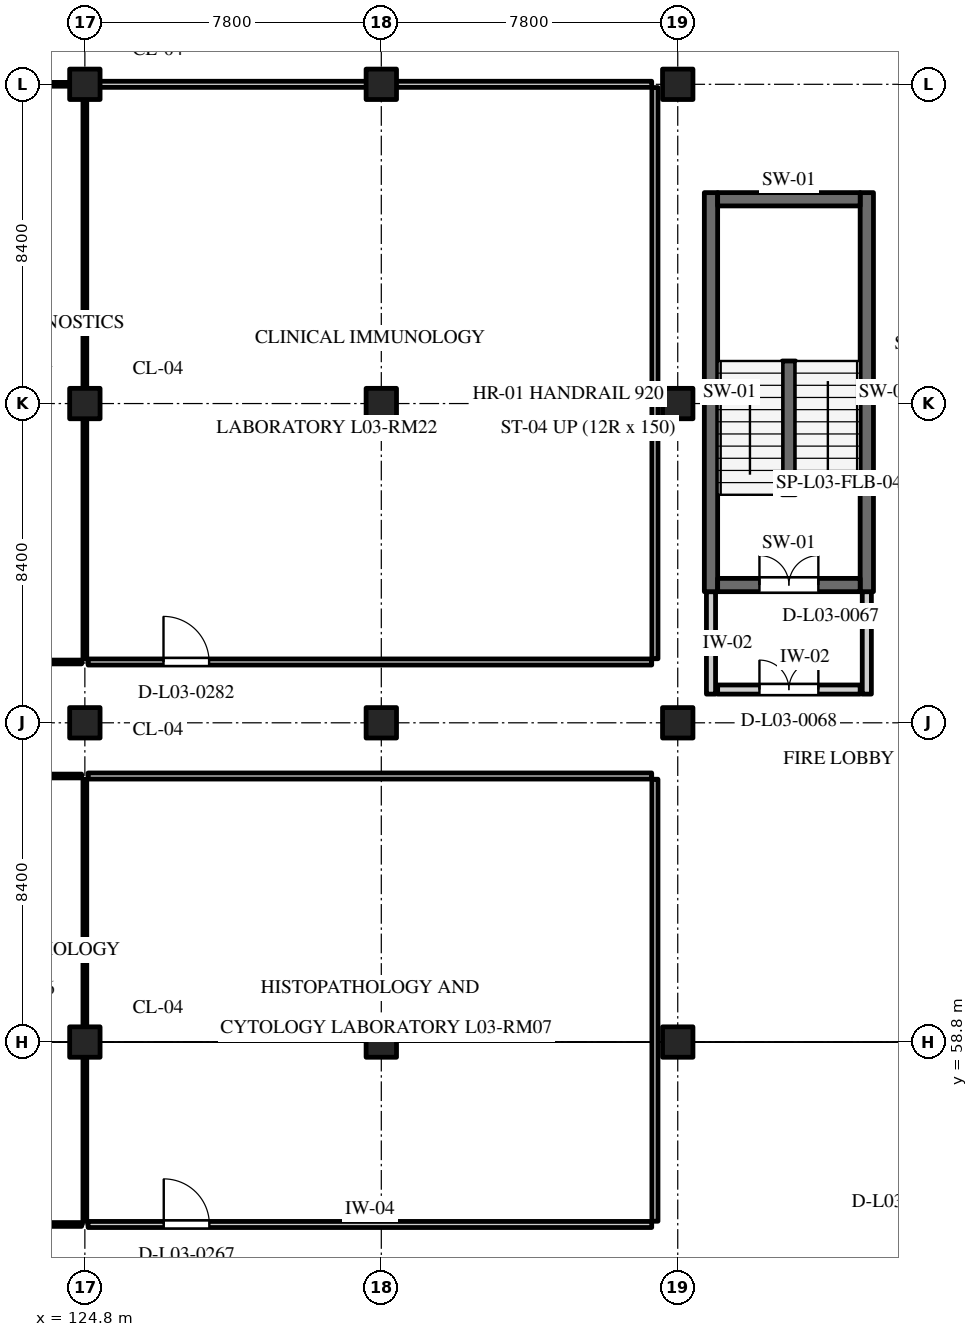
"""IFC4 building model, lengths in metres.
Left out: names, types, materials, properties, quantities, classifications, styles, units other than length and angle.
Written with IfcOpenShell. Run it as: python <this file> out.ifc"""

import sys

from ifc_helpers import new_model, si_unit, direction, frame, frame_2d, origin, origin_2d, place, context, subcontext, project, spatial, rectangle, extrude, element, fill, save


model = new_model("IFC4")
c1 = context("Model", 3, precision=1e-05, world=origin(), true_north=direction((0.0, 1.0)))
c2 = subcontext(c1, "Body", "Model", "MODEL_VIEW")
j1 = project(units=[si_unit("LENGTHUNIT", "METRE"), si_unit("PLANEANGLEUNIT", "RADIAN")], contexts=[c1])
p1 = place(None, origin())
s1 = spatial("IfcSite", under=j1, at=p1, CompositionType="ELEMENT")
p2 = place(p1, origin())
s2 = spatial("IfcBuilding", under=s1, at=p2, CompositionType="ELEMENT")
p3 = place(p2, frame((0.0, 0.0, 14.4)))
s3 = spatial("IfcBuildingStorey", under=s2, at=p3, CompositionType="ELEMENT", Elevation=14.4)
for number, where, z_axis, x_axis in (
    (1, (124.8, 58.8, 0.0), (0.0, 0.0, 1.0), (1.0, 0.0, 0.0)),
    (2, (124.8, 67.2, 0.0), (0.0, 0.0, 1.0), (1.0, 0.0, 0.0)),
    (3, (124.8, 75.6, 0.0), (0.0, 0.0, 1.0), (1.0, 0.0, 0.0)),
    (4, (124.8, 84.0, 0.0), (0.0, 0.0, 1.0), (1.0, 0.0, 0.0)),
    (5, (132.6, 58.8, 0.0), (0.0, 0.0, 1.0), (1.0, 0.0, 0.0)),
    (6, (132.6, 67.2, 0.0), (0.0, 0.0, 1.0), (1.0, 0.0, 0.0)),
    (7, (132.6, 75.6, 0.0), (0.0, 0.0, 1.0), (1.0, 0.0, 0.0)),
    (8, (132.6, 84.0, 0.0), (0.0, 0.0, 1.0), (1.0, 0.0, 0.0)),
    (9, (140.4, 58.8, 0.0), (0.0, 0.0, 1.0), (1.0, 0.0, 0.0)),
    (10, (140.4, 67.2, 0.0), (0.0, 0.0, 1.0), (1.0, 0.0, 0.0)),
    (11, (140.4, 75.6, 0.0), (0.0, 0.0, 1.0), (1.0, 0.0, 0.0)),
    (12, (140.4, 84.0, 0.0), (0.0, 0.0, 1.0), (1.0, 0.0, 0.0)),
):
    element("IfcColumn", number, at=place(p3, frame(where, z_axis=z_axis, x_axis=x_axis)), inside=s3, PredefinedType="COLUMN", context=c2, shape_type="SweptSolid", body=[
        extrude(rectangle(XDim=0.8, YDim=0.8, at=origin_2d()), origin(), (0.0, 0.0, 1.0), 3.6),
    ])
for number, where, z_axis, x_axis in (
    (13, (141.275, 70.65, 0.0), (0.0, 0.0, 1.0), (0.0, 1.0, 0.0)),
    (14, (145.375, 70.65, 0.0), (0.0, 0.0, 1.0), (0.0, 1.0, 0.0)),
):
    element("IfcWall", number, at=place(p3, frame(where, z_axis=z_axis, x_axis=x_axis)), inside=s3, PredefinedType="SHEAR", context=c2, shape_type="SweptSolid", body=[
        extrude(rectangle(XDim=10.5, YDim=0.35, at=frame_2d((5.25, 0.0))), origin(), (0.0, 0.0, 1.0), 3.6),
    ])
p4 = place(p3, frame((141.45, 80.975, 0.0), z_axis=(0.0, 0.0, 1.0), x_axis=(1.0, 0.0, 0.0)))
e15 = element("IfcWall", 15, at=p4, inside=s3, PredefinedType="SHEAR", context=c2, shape_type="SweptSolid", body=[
    extrude(rectangle(XDim=3.75, YDim=0.35, at=frame_2d((1.875, 0.0))), origin(), (0.0, 0.0, 1.0), 3.6),
])
p5 = place(p3, frame((141.45, 70.825, 0.0), z_axis=(0.0, 0.0, 1.0), x_axis=(1.0, 0.0, 0.0)))
e16 = element("IfcWall", 16, at=p5, inside=s3, PredefinedType="SHEAR", context=c2, shape_type="SweptSolid", body=[
    extrude(rectangle(XDim=3.75, YDim=0.35, at=frame_2d((1.875, 0.0))), origin(), (0.0, 0.0, 1.0), 3.27),
])
p6 = place(p5, frame((1.1, 0.0, 0.0)))
e17 = element("IfcOpeningElement", 17, at=p6, cuts=e16, PredefinedType="OPENING", context=c2, shape_type="SweptSolid", body=[
    extrude(rectangle(XDim=1.55, YDim=2.25, at=frame_2d((0.775, 1.125))), frame((0.0, 0.187, 0.0), z_axis=(0.0, -1.0, 0.0), x_axis=(1.0, 0.0, 0.0)), (0.0, 0.0, 1.0), 0.374),
])
for number, where, z_axis, x_axis in (
    (18, (141.275, 67.955, 0.0), (0.0, 0.0, 1.0), (0.0, 1.0, 0.0)),
    (19, (145.375, 67.955, 0.0), (0.0, 0.0, 1.0), (0.0, 1.0, 0.0)),
):
    element("IfcWall", number, at=place(p3, frame(where, z_axis=z_axis, x_axis=x_axis)), inside=s3, PredefinedType="STANDARD", context=c2, shape_type="SweptSolid", body=[
        extrude(rectangle(XDim=2.695, YDim=0.24, at=frame_2d((1.347, 0.0))), origin(), (0.0, 0.0, 1.0), 3.27),
    ])
p7 = place(p3, frame((141.45, 68.075, 0.0), z_axis=(0.0, 0.0, 1.0), x_axis=(1.0, 0.0, 0.0)))
e20 = element("IfcWall", 20, at=p7, inside=s3, PredefinedType="STANDARD", context=c2, shape_type="SweptSolid", body=[
    extrude(rectangle(XDim=3.75, YDim=0.24, at=frame_2d((1.875, 0.0))), origin(), (0.0, 0.0, 1.0), 3.27),
])
p8 = place(p7, frame((1.1, 0.0, 0.0)))
e21 = element("IfcOpeningElement", 21, at=p8, cuts=e20, PredefinedType="OPENING", context=c2, shape_type="SweptSolid", body=[
    extrude(rectangle(XDim=1.55, YDim=2.25, at=frame_2d((0.775, 1.125))), frame((0.0, 0.132, 0.0), z_axis=(0.0, -1.0, 0.0), x_axis=(1.0, 0.0, 0.0)), (0.0, 0.0, 1.0), 0.264),
])
p9 = place(p3, frame((143.325, 73.2, 0.0), z_axis=(0.0, 0.0, 1.0), x_axis=(0.0, 1.0, 0.0)))
e22 = element("IfcWall", 22, at=p9, inside=s3, PredefinedType="SHEAR", context=c2, shape_type="SweptSolid", body=[
    extrude(rectangle(XDim=3.52, YDim=0.35, at=frame_2d((1.76, 0.0))), origin(), (0.0, 0.0, 1.0), 3.6),
])
p10 = place(p3, frame((109.285, 54.0, 0.0), z_axis=(0.0, 0.0, 1.0), x_axis=(1.0, 0.0, 0.0)))
e23 = element("IfcWall", 23, at=p10, inside=s3, PredefinedType="PARTITIONING", context=c2, shape_type="SweptSolid", body=[
    extrude(rectangle(XDim=15.43, YDim=0.1, at=frame_2d((7.715, 0.0))), origin(), (0.0, 0.0, 1.0), 3.25),
])
p11 = place(p10, frame((1.958, 0.0, 0.0)))
e24 = element("IfcOpeningElement", 24, at=p11, cuts=e23, PredefinedType="OPENING", context=c2, shape_type="SweptSolid", body=[
    extrude(rectangle(XDim=1.95, YDim=2.35, at=frame_2d((0.975, 1.175))), frame((0.0, 0.062, 0.0), z_axis=(0.0, -1.0, 0.0), x_axis=(1.0, 0.0, 0.0)), (0.0, 0.0, 1.0), 0.124),
])
p12 = place(p3, frame((109.285, 65.8, 0.0), z_axis=(0.0, 0.0, 1.0), x_axis=(1.0, 0.0, 0.0)))
e25 = element("IfcWall", 25, at=p12, inside=s3, PredefinedType="PARTITIONING", context=c2, shape_type="SweptSolid", body=[
    extrude(rectangle(XDim=15.43, YDim=0.1, at=frame_2d((7.715, 0.0))), origin(), (0.0, 0.0, 1.0), 3.25),
])
p13 = place(p3, frame((124.8, 54.085, 0.0), z_axis=(0.0, 0.0, 1.0), x_axis=(0.0, 1.0, 0.0)))
e26 = element("IfcWall", 26, at=p13, inside=s3, PredefinedType="PARTITIONING", context=c2, shape_type="SweptSolid", body=[
    extrude(rectangle(XDim=11.63, YDim=0.1, at=frame_2d((5.815, 0.0))), origin(), (0.0, 0.0, 1.0), 3.0),
])
p14 = place(p3, frame((124.885, 54.0, 0.0), z_axis=(0.0, 0.0, 1.0), x_axis=(1.0, 0.0, 0.0)))
e27 = element("IfcWall", 27, at=p14, inside=s3, PredefinedType="PARTITIONING", context=c2, shape_type="SweptSolid", body=[
    extrude(rectangle(XDim=14.83, YDim=0.16, at=frame_2d((7.415, 0.0))), origin(), (0.0, 0.0, 1.0), 3.25),
])
p15 = place(p14, frame((1.991, 0.0, 0.0)))
e28 = element("IfcOpeningElement", 28, at=p15, cuts=e27, PredefinedType="OPENING", context=c2, shape_type="SweptSolid", body=[
    extrude(rectangle(XDim=1.2, YDim=2.15, at=frame_2d((0.6, 1.075))), frame((0.0, 0.092, 0.0), z_axis=(0.0, -1.0, 0.0), x_axis=(1.0, 0.0, 0.0)), (0.0, 0.0, 1.0), 0.184),
])
p16 = place(p3, frame((124.885, 65.8, 0.0), z_axis=(0.0, 0.0, 1.0), x_axis=(1.0, 0.0, 0.0)))
e29 = element("IfcWall", 29, at=p16, inside=s3, PredefinedType="PARTITIONING", context=c2, shape_type="SweptSolid", body=[
    extrude(rectangle(XDim=14.83, YDim=0.16, at=frame_2d((7.415, 0.0))), origin(), (0.0, 0.0, 1.0), 3.25),
])
p17 = place(p3, frame((139.8, 54.085, 0.0), z_axis=(0.0, 0.0, 1.0), x_axis=(0.0, 1.0, 0.0)))
e30 = element("IfcWall", 30, at=p17, inside=s3, PredefinedType="PARTITIONING", context=c2, shape_type="SweptSolid", body=[
    extrude(rectangle(XDim=11.63, YDim=0.16, at=frame_2d((5.815, 0.0))), origin(), (0.0, 0.0, 1.0), 3.25),
])
p18 = place(p3, frame((101.485, 68.8, 0.0), z_axis=(0.0, 0.0, 1.0), x_axis=(1.0, 0.0, 0.0)))
e31 = element("IfcWall", 31, at=p18, inside=s3, PredefinedType="PARTITIONING", context=c2, shape_type="SweptSolid", body=[
    extrude(rectangle(XDim=23.23, YDim=0.1, at=frame_2d((11.615, 0.0))), origin(), (0.0, 0.0, 1.0), 3.25),
])
p19 = place(p18, frame((1.994, 0.0, 0.0)))
e32 = element("IfcOpeningElement", 32, at=p19, cuts=e31, PredefinedType="OPENING", context=c2, shape_type="SweptSolid", body=[
    extrude(rectangle(XDim=1.2, YDim=2.15, at=frame_2d((0.6, 1.075))), frame((0.0, 0.062, 0.0), z_axis=(0.0, -1.0, 0.0), x_axis=(1.0, 0.0, 0.0)), (0.0, 0.0, 1.0), 0.124),
])
p20 = place(p3, frame((101.485, 84.0, 0.0), z_axis=(0.0, 0.0, 1.0), x_axis=(1.0, 0.0, 0.0)))
e33 = element("IfcWall", 33, at=p20, inside=s3, PredefinedType="PARTITIONING", context=c2, shape_type="SweptSolid", body=[
    extrude(rectangle(XDim=23.23, YDim=0.1, at=frame_2d((11.615, 0.0))), origin(), (0.0, 0.0, 1.0), 2.62),
])
p21 = place(p3, frame((124.8, 68.885, 0.0), z_axis=(0.0, 0.0, 1.0), x_axis=(0.0, 1.0, 0.0)))
e34 = element("IfcWall", 34, at=p21, inside=s3, PredefinedType="PARTITIONING", context=c2, shape_type="SweptSolid", body=[
    extrude(rectangle(XDim=15.03, YDim=0.1, at=frame_2d((7.515, 0.0))), origin(), (0.0, 0.0, 1.0), 2.99),
])
p22 = place(p3, frame((124.885, 68.8, 0.0), z_axis=(0.0, 0.0, 1.0), x_axis=(1.0, 0.0, 0.0)))
e35 = element("IfcWall", 35, at=p22, inside=s3, PredefinedType="PARTITIONING", context=c2, shape_type="SweptSolid", body=[
    extrude(rectangle(XDim=14.83, YDim=0.16, at=frame_2d((7.415, 0.0))), origin(), (0.0, 0.0, 1.0), 3.25),
])
p23 = place(p22, frame((1.984, 0.0, 0.0)))
e36 = element("IfcOpeningElement", 36, at=p23, cuts=e35, PredefinedType="OPENING", context=c2, shape_type="SweptSolid", body=[
    extrude(rectangle(XDim=1.2, YDim=2.15, at=frame_2d((0.6, 1.075))), frame((0.0, 0.092, 0.0), z_axis=(0.0, -1.0, 0.0), x_axis=(1.0, 0.0, 0.0)), (0.0, 0.0, 1.0), 0.184),
])
p24 = place(p3, frame((124.885, 84.0, 0.0), z_axis=(0.0, 0.0, 1.0), x_axis=(1.0, 0.0, 0.0)))
e37 = element("IfcWall", 37, at=p24, inside=s3, PredefinedType="PARTITIONING", context=c2, shape_type="SweptSolid", body=[
    extrude(rectangle(XDim=14.83, YDim=0.16, at=frame_2d((7.415, 0.0))), origin(), (0.0, 0.0, 1.0), 2.62),
])
p25 = place(p3, frame((139.8, 68.885, 0.0), z_axis=(0.0, 0.0, 1.0), x_axis=(0.0, 1.0, 0.0)))
e38 = element("IfcWall", 38, at=p25, inside=s3, PredefinedType="PARTITIONING", context=c2, shape_type="SweptSolid", body=[
    extrude(rectangle(XDim=15.03, YDim=0.16, at=frame_2d((7.515, 0.0))), origin(), (0.0, 0.0, 1.0), 3.25),
])
p26 = place(p6, origin())
e39 = element("IfcDoor", 39, at=p26, inside=s3, OperationType="DOUBLE_DOOR_SINGLE_SWING", PredefinedType="DOOR", context=c2, shape_type="SweptSolid", body=[
    extrude(rectangle(XDim=1.55, YDim=2.25, at=frame_2d((0.775, 1.125))), frame((0.0, 0.025, 0.0), z_axis=(0.0, -1.0, 0.0), x_axis=(1.0, 0.0, 0.0)), (0.0, 0.0, 1.0), 0.05),
])
fill(e17, e39)
p27 = place(p8, origin())
e40 = element("IfcDoor", 40, at=p27, inside=s3, OperationType="DOUBLE_DOOR_SINGLE_SWING", PredefinedType="DOOR", context=c2, shape_type="SweptSolid", body=[
    extrude(rectangle(XDim=1.55, YDim=2.25, at=frame_2d((0.775, 1.125))), frame((0.0, 0.025, 0.0), z_axis=(0.0, -1.0, 0.0), x_axis=(1.0, 0.0, 0.0)), (0.0, 0.0, 1.0), 0.05),
])
fill(e21, e40)
p28 = place(p15, origin())
e41 = element("IfcDoor", 41, at=p28, inside=s3, OperationType="SINGLE_SWING_LEFT", PredefinedType="DOOR", context=c2, shape_type="SweptSolid", body=[
    extrude(rectangle(XDim=1.2, YDim=2.15, at=frame_2d((0.6, 1.075))), frame((0.0, 0.025, 0.0), z_axis=(0.0, -1.0, 0.0), x_axis=(1.0, 0.0, 0.0)), (0.0, 0.0, 1.0), 0.05),
])
fill(e28, e41)
p29 = place(p23, origin())
e42 = element("IfcDoor", 42, at=p29, inside=s3, OperationType="SINGLE_SWING_LEFT", PredefinedType="DOOR", context=c2, shape_type="SweptSolid", body=[
    extrude(rectangle(XDim=1.2, YDim=2.15, at=frame_2d((0.6, 1.075))), frame((0.0, 0.025, 0.0), z_axis=(0.0, -1.0, 0.0), x_axis=(1.0, 0.0, 0.0)), (0.0, 0.0, 1.0), 0.05),
])
fill(e36, e42)
save(model, sys.argv[1])
